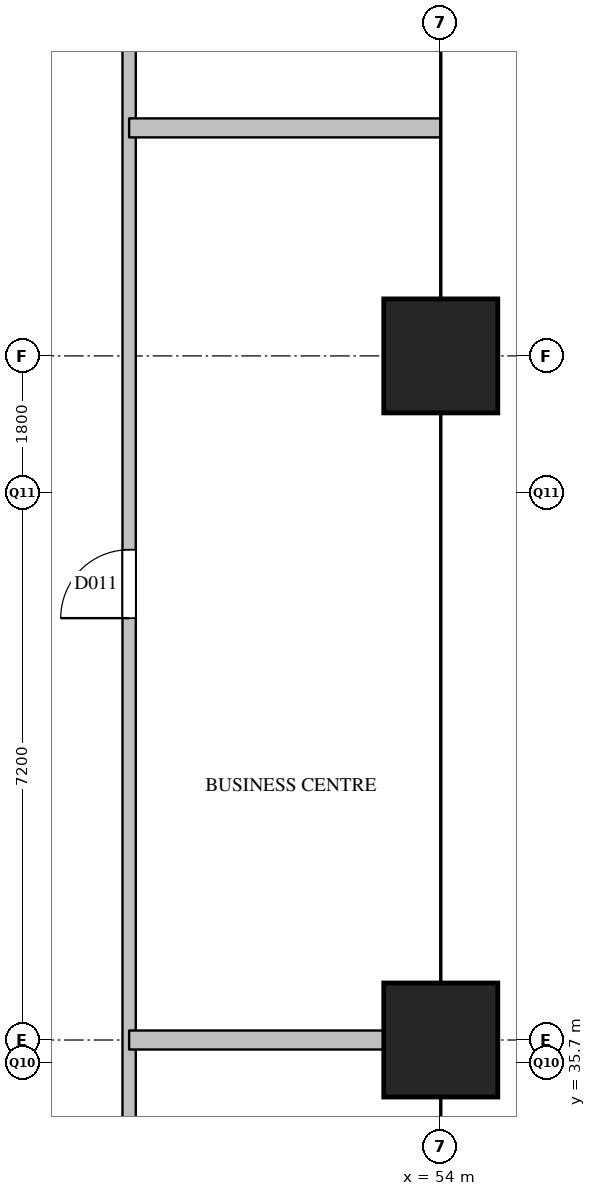
"""IFC4 building model, lengths in metres.
Left out: names, types, materials, properties, quantities, classifications, styles, units other than length and angle.
Written with IfcOpenShell. Run it as: python <this file> out.ifc"""

import sys

from ifc_helpers import new_model, si_unit, direction, frame, frame_2d, origin, origin_2d, place, context, subcontext, project, spatial, rectangle, extrude, element, fill, save


model = new_model("IFC4")
c1 = context("Model", 3, precision=1e-05, world=origin(), true_north=direction((0.0, 1.0)))
c2 = subcontext(c1, "Body", "Model", "MODEL_VIEW")
j1 = project(units=[si_unit("LENGTHUNIT", "METRE"), si_unit("PLANEANGLEUNIT", "RADIAN")], contexts=[c1])
p1 = place(None, origin())
s1 = spatial("IfcSite", under=j1, at=p1, CompositionType="ELEMENT")
p2 = place(p1, origin())
s2 = spatial("IfcBuilding", under=s1, at=p2, CompositionType="ELEMENT")
p3 = place(p2, frame((0.0, 0.0, 173.9)))
s3 = spatial("IfcBuildingStorey", under=s2, at=p3, CompositionType="ELEMENT", Elevation=173.9)
for number, where, z_axis, x_axis in (
    (1, (54.0, 36.0, 0.0), (0.0, 0.0, 1.0), (1.0, 0.0, 0.0)),
    (2, (54.0, 45.0, 0.0), (0.0, 0.0, 1.0), (1.0, 0.0, 0.0)),
):
    element("IfcColumn", number, at=place(p3, frame(where, z_axis=z_axis, x_axis=x_axis)), inside=s3, PredefinedType="COLUMN", context=c2, shape_type="SweptSolid", body=[
        extrude(rectangle(XDim=1.5, YDim=1.5, at=origin_2d()), origin(), (0.0, 0.0, 1.0), 3.9),
    ])
p4 = place(p3, frame((49.9, 28.5, 0.0), z_axis=(0.0, 0.0, 1.0), x_axis=(0.0, 1.0, 0.0)))
e3 = element("IfcWall", 3, at=p4, inside=s3, PredefinedType="PARTITIONING", context=c2, shape_type="SweptSolid", body=[
    extrude(rectangle(XDim=23.0, YDim=0.175, at=frame_2d((11.5, 0.0))), origin(), (0.0, 0.0, 1.0), 3.6),
])
p5 = place(p4, frame((3.3, 0.0, 0.0)))
e4 = element("IfcOpeningElement", 4, at=p5, cuts=e3, PredefinedType="OPENING", context=c2, shape_type="SweptSolid", body=[
    extrude(rectangle(XDim=0.9, YDim=2.1, at=frame_2d((0.45, 1.05))), frame((0.0, 0.097, 0.0), z_axis=(0.0, -1.0, 0.0), x_axis=(1.0, 0.0, 0.0)), (0.0, 0.0, 1.0), 0.195),
])
p6 = place(p4, frame((13.05, 0.0, 0.0)))
e5 = element("IfcOpeningElement", 5, at=p6, cuts=e3, PredefinedType="OPENING", context=c2, shape_type="SweptSolid", body=[
    extrude(rectangle(XDim=0.9, YDim=2.1, at=frame_2d((0.45, 1.05))), frame((0.0, 0.097, 0.0), z_axis=(0.0, -1.0, 0.0), x_axis=(1.0, 0.0, 0.0)), (0.0, 0.0, 1.0), 0.195),
])
p7 = place(p3, frame((49.9, 36.0, 0.0), z_axis=(0.0, 0.0, 1.0), x_axis=(1.0, 0.0, 0.0)))
e6 = element("IfcWall", 6, at=p7, inside=s3, PredefinedType="PARTITIONING", context=c2, shape_type="SweptSolid", body=[
    extrude(rectangle(XDim=4.1, YDim=0.25, at=frame_2d((2.05, 0.0))), origin(), (0.0, 0.0, 1.0), 3.6),
])
p8 = place(p3, frame((49.9, 48.0, 0.0), z_axis=(0.0, 0.0, 1.0), x_axis=(1.0, 0.0, 0.0)))
e7 = element("IfcWall", 7, at=p8, inside=s3, PredefinedType="PARTITIONING", context=c2, shape_type="SweptSolid", body=[
    extrude(rectangle(XDim=4.1, YDim=0.25, at=frame_2d((2.05, 0.0))), origin(), (0.0, 0.0, 1.0), 2.6),
])
p9 = place(p6, origin())
e8 = element("IfcDoor", 8, at=p9, inside=s3, OperationType="SINGLE_SWING_LEFT", PredefinedType="DOOR", context=c2, shape_type="SweptSolid", body=[
    extrude(rectangle(XDim=0.9, YDim=2.1, at=frame_2d((0.45, 1.05))), frame((0.0, 0.025, 0.0), z_axis=(0.0, -1.0, 0.0), x_axis=(1.0, 0.0, 0.0)), (0.0, 0.0, 1.0), 0.05),
])
fill(e5, e8)
save(model, sys.argv[1])
